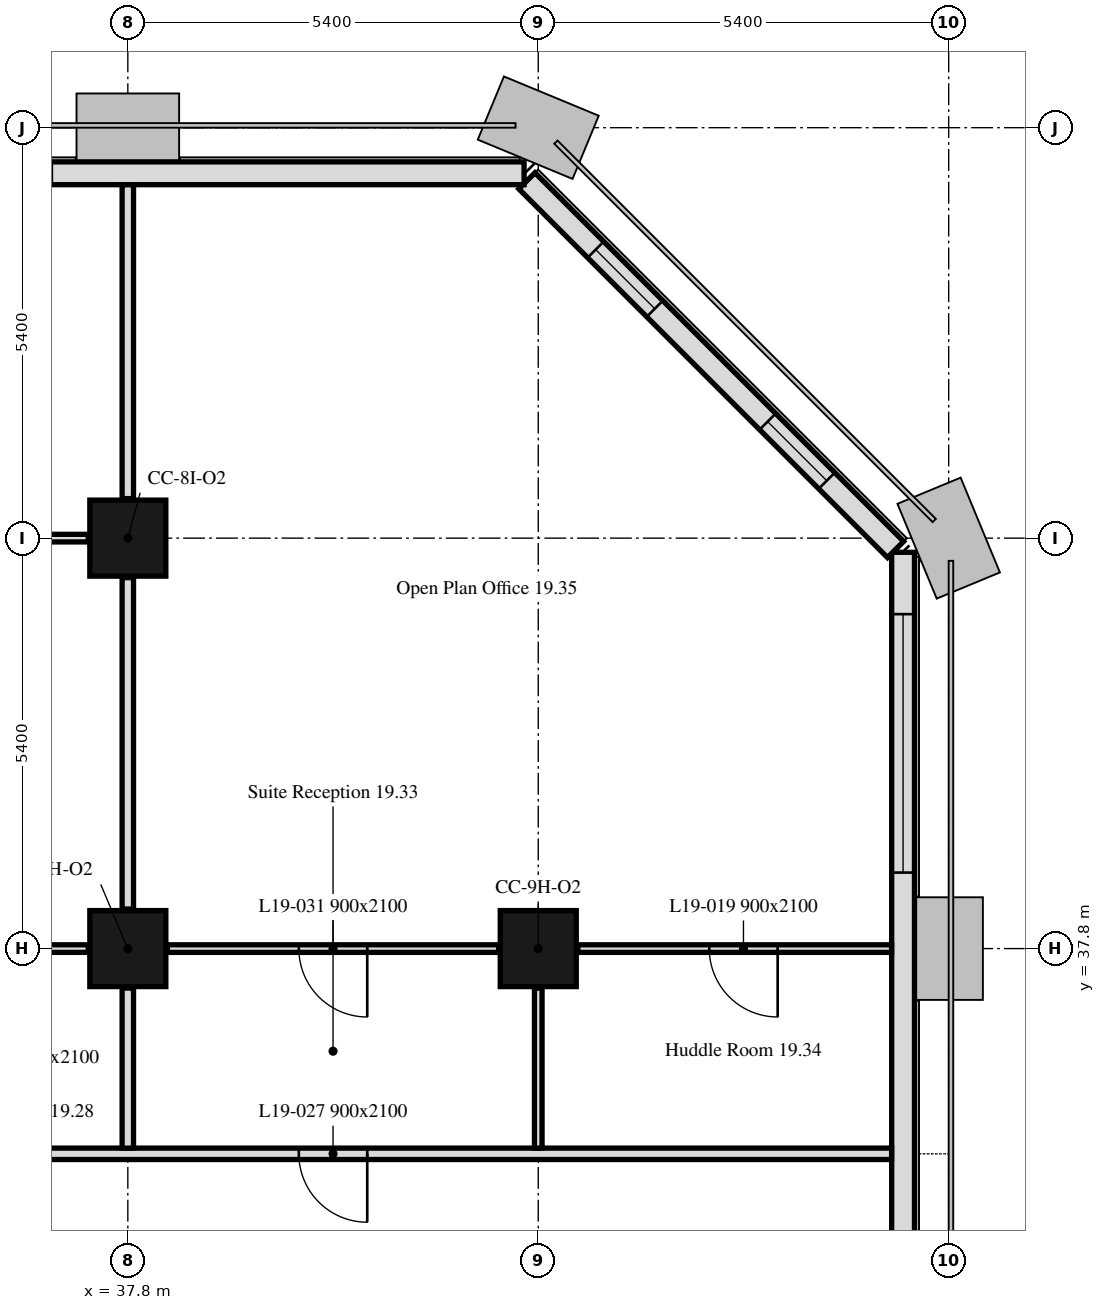
"""IFC4 building model, lengths in metres.
Left out: names, types, materials, properties, quantities, classifications, styles, units other than length and angle.
Written with IfcOpenShell. Run it as: python <this file> out.ifc"""

import sys

from ifc_helpers import new_model, si_unit, direction, frame, frame_2d, origin, origin_2d, place, context, subcontext, project, spatial, rectangle, extrude, element, fill, save


model = new_model("IFC4")
c1 = context("Model", 3, precision=1e-05, world=origin(), true_north=direction((0.0, 1.0)))
c2 = subcontext(c1, "Body", "Model", "MODEL_VIEW")
j1 = project(units=[si_unit("LENGTHUNIT", "METRE"), si_unit("PLANEANGLEUNIT", "RADIAN")], contexts=[c1])
p1 = place(None, origin())
s1 = spatial("IfcSite", under=j1, at=p1, CompositionType="ELEMENT")
p2 = place(p1, origin())
s2 = spatial("IfcBuilding", under=s1, at=p2, CompositionType="ELEMENT")
p3 = place(p2, frame((0.0, 0.0, 84.0)))
s3 = spatial("IfcBuildingStorey", under=s2, at=p3, CompositionType="ELEMENT", Elevation=84.0)
for number, where, z_axis, x_axis in (
    (1, (37.8, 37.8, 0.0), (0.0, 0.0, 1.0), (1.0, 0.0, 0.0)),
    (2, (43.2, 37.8, 0.0), (0.0, 0.0, 1.0), (1.0, 0.0, 0.0)),
    (3, (37.8, 43.2, 0.0), (0.0, 0.0, 1.0), (1.0, 0.0, 0.0)),
):
    element("IfcColumn", number, at=place(p3, frame(where, z_axis=z_axis, x_axis=x_axis)), inside=s3, PredefinedType="COLUMN", context=c2, shape_type="SweptSolid", body=[
        extrude(rectangle(XDim=1.0, YDim=1.0, at=origin_2d()), origin(), (0.0, 0.0, 1.0), 3.5),
    ])
p4 = place(p3, frame((48.0, 10.986, 0.0), z_axis=(0.0, 0.0, 1.0), x_axis=(0.0, 1.0, 0.0)))
e4 = element("IfcWall", 4, at=p4, inside=s3, PredefinedType="SOLIDWALL", context=c2, shape_type="SweptSolid", body=[
    extrude(rectangle(XDim=32.027, YDim=0.3, at=frame_2d((16.014, 0.0))), origin(), (0.0, 0.0, 1.0), 3.5),
])
p5 = place(p4, frame((6.214, 0.0, 0.9)))
e5 = element("IfcOpeningElement", 5, at=p5, cuts=e4, PredefinedType="OPENING", context=c2, shape_type="SweptSolid", body=[
    extrude(rectangle(XDim=3.4, YDim=1.7, at=frame_2d((1.7, 0.85))), frame((0.0, 0.16, 0.0), z_axis=(0.0, -1.0, 0.0), x_axis=(1.0, 0.0, 0.0)), (0.0, 0.0, 1.0), 0.32),
])
p6 = place(p4, frame((17.014, 0.0, 0.9)))
e6 = element("IfcOpeningElement", 6, at=p6, cuts=e4, PredefinedType="OPENING", context=c2, shape_type="SweptSolid", body=[
    extrude(rectangle(XDim=3.4, YDim=1.7, at=frame_2d((1.7, 0.85))), frame((0.0, 0.16, 0.0), z_axis=(0.0, -1.0, 0.0), x_axis=(1.0, 0.0, 0.0)), (0.0, 0.0, 1.0), 0.32),
])
p7 = place(p4, frame((27.814, 0.0, 0.9)))
e7 = element("IfcOpeningElement", 7, at=p7, cuts=e4, PredefinedType="OPENING", context=c2, shape_type="SweptSolid", body=[
    extrude(rectangle(XDim=3.4, YDim=1.7, at=frame_2d((1.7, 0.85))), frame((0.0, 0.16, 0.0), z_axis=(0.0, -1.0, 0.0), x_axis=(1.0, 0.0, 0.0)), (0.0, 0.0, 1.0), 0.32),
])
p8 = place(p3, frame((47.901, 43.051, 0.0), z_axis=(0.0, 0.0, 1.0), x_axis=(-0.707106781187, 0.707106781187, 0.0)))
e8 = element("IfcWall", 8, at=p8, inside=s3, PredefinedType="SOLIDWALL", context=c2, shape_type="SweptSolid", body=[
    extrude(rectangle(XDim=6.86, YDim=0.3, at=frame_2d((3.43, 0.0))), origin(), (0.0, 0.0, 1.0), 3.5),
])
p9 = place(p8, frame((1.28, 0.0, 0.9)))
e9 = element("IfcOpeningElement", 9, at=p9, cuts=e8, PredefinedType="OPENING", context=c2, shape_type="SweptSolid", body=[
    extrude(rectangle(XDim=1.1, YDim=1.7, at=frame_2d((0.55, 0.85))), frame((0.0, 0.16, 0.0), z_axis=(0.0, -1.0, 0.0), x_axis=(1.0, 0.0, 0.0)), (0.0, 0.0, 1.0), 0.32),
])
p10 = place(p8, frame((4.48, 0.0, 0.9)))
e10 = element("IfcOpeningElement", 10, at=p10, cuts=e8, PredefinedType="OPENING", context=c2, shape_type="SweptSolid", body=[
    extrude(rectangle(XDim=1.1, YDim=1.7, at=frame_2d((0.55, 0.85))), frame((0.0, 0.16, 0.0), z_axis=(0.0, -1.0, 0.0), x_axis=(1.0, 0.0, 0.0)), (0.0, 0.0, 1.0), 0.32),
])
p11 = place(p3, frame((43.014, 48.0, 0.0), z_axis=(0.0, 0.0, 1.0), x_axis=(-1.0, 0.0, 0.0)))
e11 = element("IfcWall", 11, at=p11, inside=s3, PredefinedType="SOLIDWALL", context=c2, shape_type="SweptSolid", body=[
    extrude(rectangle(XDim=32.027, YDim=0.3, at=frame_2d((16.014, 0.0))), origin(), (0.0, 0.0, 1.0), 3.5),
])
p12 = place(p11, frame((6.214, 0.0, 0.9)))
e12 = element("IfcOpeningElement", 12, at=p12, cuts=e11, PredefinedType="OPENING", context=c2, shape_type="SweptSolid", body=[
    extrude(rectangle(XDim=3.4, YDim=1.7, at=frame_2d((1.7, 0.85))), frame((0.0, 0.16, 0.0), z_axis=(0.0, -1.0, 0.0), x_axis=(1.0, 0.0, 0.0)), (0.0, 0.0, 1.0), 0.32),
])
p13 = place(p11, frame((17.014, 0.0, 0.9)))
e13 = element("IfcOpeningElement", 13, at=p13, cuts=e11, PredefinedType="OPENING", context=c2, shape_type="SweptSolid", body=[
    extrude(rectangle(XDim=3.4, YDim=1.7, at=frame_2d((1.7, 0.85))), frame((0.0, 0.16, 0.0), z_axis=(0.0, -1.0, 0.0), x_axis=(1.0, 0.0, 0.0)), (0.0, 0.0, 1.0), 0.32),
])
p14 = place(p11, frame((27.814, 0.0, 0.9)))
e14 = element("IfcOpeningElement", 14, at=p14, cuts=e11, PredefinedType="OPENING", context=c2, shape_type="SweptSolid", body=[
    extrude(rectangle(XDim=3.4, YDim=1.7, at=frame_2d((1.7, 0.85))), frame((0.0, 0.16, 0.0), z_axis=(0.0, -1.0, 0.0), x_axis=(1.0, 0.0, 0.0)), (0.0, 0.0, 1.0), 0.32),
])
p15 = place(p3, frame((47.849, 35.1, 0.0), z_axis=(0.0, 0.0, 1.0), x_axis=(-1.0, 0.0, 0.0)))
e15 = element("IfcWall", 15, at=p15, inside=s3, PredefinedType="PARTITIONING", context=c2, shape_type="SweptSolid", body=[
    extrude(rectangle(XDim=41.698, YDim=0.15, at=frame_2d((20.849, 0.0))), origin(), (0.0, 0.0, 1.0), 2.75),
])
p16 = place(p15, frame((29.119, 0.0, 0.0)))
e16 = element("IfcOpeningElement", 16, at=p16, cuts=e15, PredefinedType="OPENING", context=c2, shape_type="SweptSolid", body=[
    extrude(rectangle(XDim=0.9, YDim=2.1, at=frame_2d((0.45, 1.05))), frame((0.0, 0.075, 0.0), z_axis=(0.0, -1.0, 0.0), x_axis=(1.0, 0.0, 0.0)), (0.0, 0.0, 1.0), 0.15),
])
p17 = place(p15, frame((27.879, 0.0, 0.0)))
e17 = element("IfcOpeningElement", 17, at=p17, cuts=e15, PredefinedType="OPENING", context=c2, shape_type="SweptSolid", body=[
    extrude(rectangle(XDim=0.9, YDim=2.1, at=frame_2d((0.45, 1.05))), frame((0.0, 0.075, 0.0), z_axis=(0.0, -1.0, 0.0), x_axis=(1.0, 0.0, 0.0)), (0.0, 0.0, 1.0), 0.15),
])
p18 = place(p15, frame((18.319, 0.0, 0.0)))
e18 = element("IfcOpeningElement", 18, at=p18, cuts=e15, PredefinedType="OPENING", context=c2, shape_type="SweptSolid", body=[
    extrude(rectangle(XDim=0.9, YDim=2.1, at=frame_2d((0.45, 1.05))), frame((0.0, 0.075, 0.0), z_axis=(0.0, -1.0, 0.0), x_axis=(1.0, 0.0, 0.0)), (0.0, 0.0, 1.0), 0.15),
])
p19 = place(p15, frame((11.679, 0.0, 0.0)))
e19 = element("IfcOpeningElement", 19, at=p19, cuts=e15, PredefinedType="OPENING", context=c2, shape_type="SweptSolid", body=[
    extrude(rectangle(XDim=0.9, YDim=2.1, at=frame_2d((0.45, 1.05))), frame((0.0, 0.075, 0.0), z_axis=(0.0, -1.0, 0.0), x_axis=(1.0, 0.0, 0.0)), (0.0, 0.0, 1.0), 0.15),
])
p20 = place(p15, frame((38.624, 0.0, 0.0)))
e20 = element("IfcOpeningElement", 20, at=p20, cuts=e15, PredefinedType="OPENING", context=c2, shape_type="SweptSolid", body=[
    extrude(rectangle(XDim=0.9, YDim=2.1, at=frame_2d((0.45, 1.05))), frame((0.0, 0.075, 0.0), z_axis=(0.0, -1.0, 0.0), x_axis=(1.0, 0.0, 0.0)), (0.0, 0.0, 1.0), 0.15),
])
p21 = place(p15, frame((23.099, 0.0, 0.0)))
e21 = element("IfcOpeningElement", 21, at=p21, cuts=e15, PredefinedType="OPENING", context=c2, shape_type="SweptSolid", body=[
    extrude(rectangle(XDim=0.9, YDim=2.1, at=frame_2d((0.45, 1.05))), frame((0.0, 0.075, 0.0), z_axis=(0.0, -1.0, 0.0), x_axis=(1.0, 0.0, 0.0)), (0.0, 0.0, 1.0), 0.15),
])
p22 = place(p15, frame((6.899, 0.0, 0.0)))
e22 = element("IfcOpeningElement", 22, at=p22, cuts=e15, PredefinedType="OPENING", context=c2, shape_type="SweptSolid", body=[
    extrude(rectangle(XDim=0.9, YDim=2.1, at=frame_2d((0.45, 1.05))), frame((0.0, 0.075, 0.0), z_axis=(0.0, -1.0, 0.0), x_axis=(1.0, 0.0, 0.0)), (0.0, 0.0, 1.0), 0.15),
])
p23 = place(p3, frame((37.8, 35.175, 0.0), z_axis=(0.0, 0.0, 1.0), x_axis=(0.0, 1.0, 0.0)))
e23 = element("IfcWall", 23, at=p23, inside=s3, PredefinedType="PARTITIONING", context=c2, shape_type="SweptSolid", body=[
    extrude(rectangle(XDim=2.105, YDim=0.15, at=frame_2d((1.052, 0.0))), origin(), (0.0, 0.0, 1.0), 2.75),
])
p24 = place(p3, frame((37.28, 37.8, 0.0), z_axis=(0.0, 0.0, 1.0), x_axis=(-1.0, 0.0, 0.0)))
e24 = element("IfcWall", 24, at=p24, inside=s3, PredefinedType="PARTITIONING", context=c2, shape_type="SweptSolid", body=[
    extrude(rectangle(XDim=4.36, YDim=0.1, at=frame_2d((2.18, 0.0))), origin(), (0.0, 0.0, 1.0), 2.75),
])
p25 = place(p3, frame((37.8, 38.32, 0.0), z_axis=(0.0, 0.0, 1.0), x_axis=(0.0, 1.0, 0.0)))
e25 = element("IfcWall", 25, at=p25, inside=s3, PredefinedType="PARTITIONING", context=c2, shape_type="SweptSolid", body=[
    extrude(rectangle(XDim=4.36, YDim=0.15, at=frame_2d((2.18, 0.0))), origin(), (0.0, 0.0, 1.0), 2.75),
])
p26 = place(p3, frame((37.28, 43.2, 0.0), z_axis=(0.0, 0.0, 1.0), x_axis=(-1.0, 0.0, 0.0)))
e26 = element("IfcWall", 26, at=p26, inside=s3, PredefinedType="PARTITIONING", context=c2, shape_type="SweptSolid", body=[
    extrude(rectangle(XDim=4.36, YDim=0.1, at=frame_2d((2.18, 0.0))), origin(), (0.0, 0.0, 1.0), 3.5),
])
p27 = place(p26, frame((1.73, 0.0, 0.0)))
e27 = element("IfcOpeningElement", 27, at=p27, cuts=e26, PredefinedType="OPENING", context=c2, shape_type="SweptSolid", body=[
    extrude(rectangle(XDim=0.9, YDim=2.1, at=frame_2d((0.45, 1.05))), frame((0.0, 0.05, 0.0), z_axis=(0.0, -1.0, 0.0), x_axis=(1.0, 0.0, 0.0)), (0.0, 0.0, 1.0), 0.1),
])
p28 = place(p3, frame((37.8, 43.72, 0.0), z_axis=(0.0, 0.0, 1.0), x_axis=(0.0, 1.0, 0.0)))
e28 = element("IfcWall", 28, at=p28, inside=s3, PredefinedType="PARTITIONING", context=c2, shape_type="SweptSolid", body=[
    extrude(rectangle(XDim=4.129, YDim=0.15, at=frame_2d((2.064, 0.0))), origin(), (0.0, 0.0, 1.0), 2.75),
])
p29 = place(p3, frame((43.2, 35.175, 0.0), z_axis=(0.0, 0.0, 1.0), x_axis=(0.0, 1.0, 0.0)))
e29 = element("IfcWall", 29, at=p29, inside=s3, PredefinedType="PARTITIONING", context=c2, shape_type="SweptSolid", body=[
    extrude(rectangle(XDim=2.105, YDim=0.1, at=frame_2d((1.052, 0.0))), origin(), (0.0, 0.0, 1.0), 3.5),
])
p30 = place(p3, frame((42.68, 37.8, 0.0), z_axis=(0.0, 0.0, 1.0), x_axis=(-1.0, 0.0, 0.0)))
e30 = element("IfcWall", 30, at=p30, inside=s3, PredefinedType="PARTITIONING", context=c2, shape_type="SweptSolid", body=[
    extrude(rectangle(XDim=4.36, YDim=0.1, at=frame_2d((2.18, 0.0))), origin(), (0.0, 0.0, 1.0), 2.75),
])
p31 = place(p30, frame((1.73, 0.0, 0.0)))
e31 = element("IfcOpeningElement", 31, at=p31, cuts=e30, PredefinedType="OPENING", context=c2, shape_type="SweptSolid", body=[
    extrude(rectangle(XDim=0.9, YDim=2.1, at=frame_2d((0.45, 1.05))), frame((0.0, 0.05, 0.0), z_axis=(0.0, -1.0, 0.0), x_axis=(1.0, 0.0, 0.0)), (0.0, 0.0, 1.0), 0.1),
])
p32 = place(p3, frame((47.849, 37.8, 0.0), z_axis=(0.0, 0.0, 1.0), x_axis=(-1.0, 0.0, 0.0)))
e32 = element("IfcWall", 32, at=p32, inside=s3, PredefinedType="PARTITIONING", context=c2, shape_type="SweptSolid", body=[
    extrude(rectangle(XDim=4.129, YDim=0.1, at=frame_2d((2.064, 0.0))), origin(), (0.0, 0.0, 1.0), 2.75),
])
p33 = place(p32, frame((1.499, 0.0, 0.0)))
e33 = element("IfcOpeningElement", 33, at=p33, cuts=e32, PredefinedType="OPENING", context=c2, shape_type="SweptSolid", body=[
    extrude(rectangle(XDim=0.9, YDim=2.1, at=frame_2d((0.45, 1.05))), frame((0.0, 0.05, 0.0), z_axis=(0.0, -1.0, 0.0), x_axis=(1.0, 0.0, 0.0)), (0.0, 0.0, 1.0), 0.1),
])
p34 = place(p7, origin())
e34 = element("IfcWindow", 34, at=p34, inside=s3, PartitioningType="SINGLE_PANEL", PredefinedType="WINDOW", context=c2, shape_type="SweptSolid", body=[
    extrude(rectangle(XDim=3.4, YDim=1.7, at=frame_2d((1.7, 0.85))), frame((0.0, 0.03, 0.0), z_axis=(0.0, -1.0, 0.0), x_axis=(1.0, 0.0, 0.0)), (0.0, 0.0, 1.0), 0.06),
])
fill(e7, e34)
p35 = place(p9, origin())
e35 = element("IfcWindow", 35, at=p35, inside=s3, PartitioningType="SINGLE_PANEL", PredefinedType="WINDOW", context=c2, shape_type="SweptSolid", body=[
    extrude(rectangle(XDim=1.1, YDim=1.7, at=frame_2d((0.55, 0.85))), frame((0.0, 0.03, 0.0), z_axis=(0.0, -1.0, 0.0), x_axis=(1.0, 0.0, 0.0)), (0.0, 0.0, 1.0), 0.06),
])
fill(e9, e35)
p36 = place(p10, origin())
e36 = element("IfcWindow", 36, at=p36, inside=s3, PartitioningType="SINGLE_PANEL", PredefinedType="WINDOW", context=c2, shape_type="SweptSolid", body=[
    extrude(rectangle(XDim=1.1, YDim=1.7, at=frame_2d((0.55, 0.85))), frame((0.0, 0.03, 0.0), z_axis=(0.0, -1.0, 0.0), x_axis=(1.0, 0.0, 0.0)), (0.0, 0.0, 1.0), 0.06),
])
fill(e10, e36)
p37 = place(p33, origin())
e37 = element("IfcDoor", 37, at=p37, inside=s3, OperationType="SINGLE_SWING_LEFT", PredefinedType="DOOR", context=c2, shape_type="SweptSolid", body=[
    extrude(rectangle(XDim=0.9, YDim=2.1, at=frame_2d((0.45, 1.05))), frame((0.0, 0.025, 0.0), z_axis=(0.0, -1.0, 0.0), x_axis=(1.0, 0.0, 0.0)), (0.0, 0.0, 1.0), 0.05),
])
fill(e33, e37)
p38 = place(p22, origin())
e38 = element("IfcDoor", 38, at=p38, inside=s3, OperationType="SINGLE_SWING_RIGHT", PredefinedType="DOOR", context=c2, shape_type="SweptSolid", body=[
    extrude(rectangle(XDim=0.9, YDim=2.1, at=frame_2d((0.45, 1.05))), frame((0.0, 0.025, 0.0), z_axis=(0.0, -1.0, 0.0), x_axis=(1.0, 0.0, 0.0)), (0.0, 0.0, 1.0), 0.05),
])
fill(e22, e38)
p39 = place(p31, origin())
e39 = element("IfcDoor", 39, at=p39, inside=s3, OperationType="SINGLE_SWING_RIGHT", PredefinedType="DOOR", context=c2, shape_type="SweptSolid", body=[
    extrude(rectangle(XDim=0.9, YDim=2.1, at=frame_2d((0.45, 1.05))), frame((0.0, 0.025, 0.0), z_axis=(0.0, -1.0, 0.0), x_axis=(1.0, 0.0, 0.0)), (0.0, 0.0, 1.0), 0.05),
])
fill(e31, e39)
save(model, sys.argv[1])
